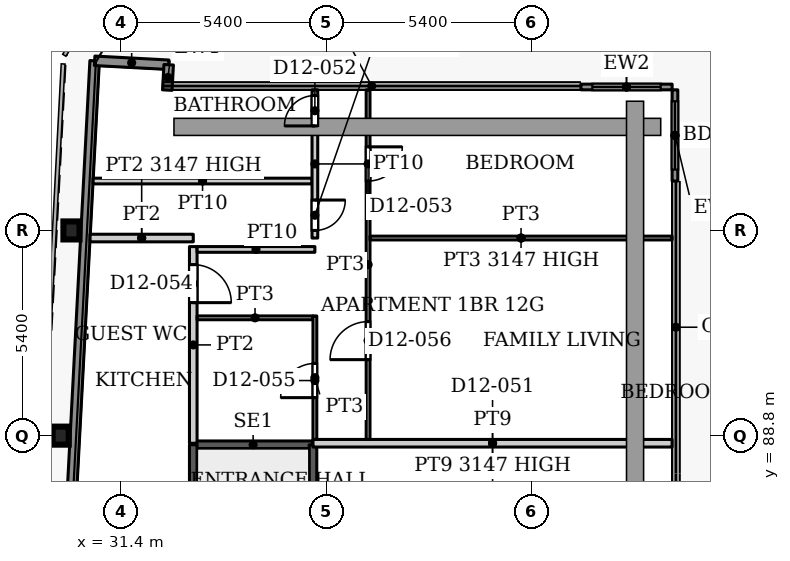
"""IFC4 building model, lengths in metres.
Left out: names, types, materials, properties, quantities, classifications, styles, units other than length and angle.
Written with IfcOpenShell. Run it as: python <this file> out.ifc"""

import sys

from ifc_helpers import new_model, si_unit, direction, frame, frame_2d, origin, origin_2d, place, context, subcontext, project, spatial, rectangle, i_section, extrude, source, transform, mapped, element, fill, save


model = new_model("IFC4")
c1 = context("Model", 3, precision=1e-05, world=origin(), true_north=direction((0.0, 1.0)))
c2 = subcontext(c1, "Body", "Model", "MODEL_VIEW")
j1 = project(units=[si_unit("LENGTHUNIT", "METRE"), si_unit("PLANEANGLEUNIT", "RADIAN")], contexts=[c1])
p1 = place(None, origin())
s1 = spatial("IfcSite", under=j1, at=p1, CompositionType="ELEMENT")
p2 = place(p1, origin())
s2 = spatial("IfcBuilding", under=s1, at=p2, CompositionType="ELEMENT")
p3 = place(p2, frame((0.0, 0.0, 53.9)))
s3 = spatial("IfcBuildingStorey", under=s2, at=p3, CompositionType="ELEMENT", Elevation=53.9)
for number, where, z_axis, x_axis in (
    (1, (29.811, 88.8, 0.0), (0.0, 0.0, 1.0), (1.0, 0.0, 0.0)),
    (2, (30.095, 94.2, 0.0), (0.0, 0.0, 1.0), (1.0, 0.0, 0.0)),
):
    element("IfcColumn", number, at=place(p3, frame(where, z_axis=z_axis, x_axis=x_axis)), inside=s3, PredefinedType="COLUMN", context=c2, shape_type="SweptSolid", body=[
        extrude(i_section(OverallWidth=0.424, OverallDepth=0.474, WebThickness=0.048, FlangeThickness=0.077, FilletRadius=0.014, at=origin_2d()), origin(), (0.0, 0.0, 1.0), 3.9),
    ])
p4 = place(p3, frame((27.195, 31.969, 0.0), z_axis=(0.0, 0.0, 1.0), x_axis=(0.052554995867, 0.998618031286, 0.0)))
e3 = element("IfcWall", 3, at=p4, inside=s3, PredefinedType="SOLIDWALL", context=c2, shape_type="SweptSolid", body=[
    extrude(rectangle(XDim=66.787, YDim=0.25, at=frame_2d((33.394, 0.0))), origin(), (0.0, 0.0, 1.0), 3.75),
])
p5 = place(p3, frame((30.705, 98.664, 0.0), z_axis=(0.0, 0.0, 1.0), x_axis=(0.998577785791, -0.053314216913, 0.0)))
e4 = element("IfcWall", 4, at=p5, inside=s3, PredefinedType="SOLIDWALL", context=c2, shape_type="SweptSolid", body=[
    extrude(rectangle(XDim=1.951, YDim=0.25, at=frame_2d((0.975, 0.0))), origin(), (0.0, 0.0, 1.0), 3.75),
])
p6 = place(p3, frame((32.653, 98.56, 0.0), z_axis=(0.0, 0.0, 1.0), x_axis=(-0.054093451632, -0.998535877418, 0.0)))
e5 = element("IfcWall", 5, at=p6, inside=s3, PredefinedType="SOLIDWALL", context=c2, shape_type="SweptSolid", body=[
    extrude(rectangle(XDim=0.668, YDim=0.25, at=frame_2d((0.334, 0.0))), origin(), (0.0, 0.0, 1.0), 3.75),
])
p7 = place(p3, frame((43.5, 97.975, 0.0), z_axis=(0.0, 0.0, 1.0), x_axis=(1.0, 0.0, 0.0)))
e6 = element("IfcWall", 6, at=p7, inside=s3, PredefinedType="SOLIDWALL", context=c2, shape_type="SweptSolid", body=[
    extrude(rectangle(XDim=2.4, YDim=0.15, at=frame_2d((1.2, 0.0))), origin(), (0.0, 0.0, 1.0), 3.75),
])
p8 = place(p7, frame((0.3, 0.0, 0.0)))
e7 = element("IfcOpeningElement", 7, at=p8, cuts=e6, PredefinedType="OPENING", context=c2, shape_type="SweptSolid", body=[
    extrude(rectangle(XDim=1.8, YDim=2.4, at=frame_2d((0.9, 1.2))), frame((0.0, 0.085, 0.0), z_axis=(0.0, -1.0, 0.0), x_axis=(1.0, 0.0, 0.0)), (0.0, 0.0, 1.0), 0.17),
])
p9 = place(p3, frame((45.975, 97.9, 0.0), z_axis=(0.0, 0.0, 1.0), x_axis=(0.0, -1.0, 0.0)))
e8 = element("IfcWall", 8, at=p9, inside=s3, PredefinedType="SOLIDWALL", context=c2, shape_type="SweptSolid", body=[
    extrude(rectangle(XDim=2.4, YDim=0.15, at=frame_2d((1.2, 0.0))), origin(), (0.0, 0.0, 1.0), 3.75),
])
p10 = place(p9, frame((0.3, 0.0, 0.0)))
e9 = element("IfcOpeningElement", 9, at=p10, cuts=e8, PredefinedType="OPENING", context=c2, shape_type="SweptSolid", body=[
    extrude(rectangle(XDim=1.8, YDim=2.4, at=frame_2d((0.9, 1.2))), frame((0.0, 0.085, 0.0), z_axis=(0.0, -1.0, 0.0), x_axis=(1.0, 0.0, 0.0)), (0.0, 0.0, 1.0), 0.17),
])
p11 = place(p3, frame((33.3, 88.56, 0.0), z_axis=(0.0, 0.0, 1.0), x_axis=(1.0, 0.0, 0.0)))
e10 = element("IfcWall", 10, at=p11, inside=s3, PredefinedType="SHEAR", context=c2, shape_type="SweptSolid", body=[
    extrude(rectangle(XDim=3.15, YDim=0.2, at=frame_2d((1.575, 0.0))), origin(), (0.0, 0.0, 1.0), 3.9),
])
p12 = place(p3, frame((33.3, 79.4, 0.0), z_axis=(0.0, 0.0, 1.0), x_axis=(0.0, 1.0, 0.0)))
e11 = element("IfcWall", 11, at=p12, inside=s3, PredefinedType="SHEAR", context=c2, shape_type="SweptSolid", body=[
    extrude(rectangle(XDim=9.16, YDim=0.2, at=frame_2d((4.58, 0.0))), origin(), (0.0, 0.0, 1.0), 3.9),
])
p13 = place(p12, frame((0.35, 0.0, 0.0)))
e12 = element("IfcOpeningElement", 12, at=p13, cuts=e11, PredefinedType="OPENING", context=c2, shape_type="SweptSolid", body=[
    extrude(rectangle(XDim=1.1, YDim=2.2, at=frame_2d((0.55, 1.1))), frame((0.0, 0.11, 0.0), z_axis=(0.0, -1.0, 0.0), x_axis=(1.0, 0.0, 0.0)), (0.0, 0.0, 1.0), 0.22),
])
p14 = place(p3, frame((36.45, 79.4, 0.0), z_axis=(0.0, 0.0, 1.0), x_axis=(0.0, 1.0, 0.0)))
e13 = element("IfcWall", 13, at=p14, inside=s3, PredefinedType="SHEAR", context=c2, shape_type="SweptSolid", body=[
    extrude(rectangle(XDim=9.16, YDim=0.2, at=frame_2d((4.58, 0.0))), origin(), (0.0, 0.0, 1.0), 3.9),
])
p15 = place(p3, frame((30.664, 95.5, 0.0), z_axis=(0.0, 0.0, 1.0), x_axis=(1.0, 0.0, 0.0)))
e14 = element("IfcWall", 14, at=p15, inside=s3, PredefinedType="PARTITIONING", context=c2, shape_type="SweptSolid", body=[
    extrude(rectangle(XDim=5.761, YDim=0.15, at=frame_2d((2.88, 0.0))), origin(), (0.0, 0.0, 1.0), 3.6),
])
p16 = place(p3, frame((30.585, 94.0, 0.0), z_axis=(0.0, 0.0, 1.0), x_axis=(1.0, 0.0, 0.0)))
e15 = element("IfcWall", 15, at=p16, inside=s3, PredefinedType="PARTITIONING", context=c2, shape_type="SweptSolid", body=[
    extrude(rectangle(XDim=2.715, YDim=0.2, at=frame_2d((1.358, 0.0))), origin(), (0.0, 0.0, 1.0), 3.147),
])
p17 = place(p3, frame((33.3, 88.6, 0.0), z_axis=(0.0, 0.0, 1.0), x_axis=(0.0, 1.0, 0.0)))
e16 = element("IfcWall", 16, at=p17, inside=s3, PredefinedType="PARTITIONING", context=c2, shape_type="SweptSolid", body=[
    extrude(rectangle(XDim=5.175, YDim=0.2, at=frame_2d((2.587, 0.0))), origin(), (0.0, 0.0, 1.0), 3.6),
])
p18 = place(p17, frame((3.7, 0.0, 0.0)))
e17 = element("IfcOpeningElement", 17, at=p18, cuts=e16, PredefinedType="OPENING", context=c2, shape_type="SweptSolid", body=[
    extrude(rectangle(XDim=1.0, YDim=2.1, at=frame_2d((0.5, 1.05))), frame((0.0, 0.11, 0.0), z_axis=(0.0, -1.0, 0.0), x_axis=(1.0, 0.0, 0.0)), (0.0, 0.0, 1.0), 0.22),
])
p19 = place(p3, frame((33.4, 91.9, 0.0), z_axis=(0.0, 0.0, 1.0), x_axis=(1.0, 0.0, 0.0)))
e18 = element("IfcWall", 18, at=p19, inside=s3, PredefinedType="PARTITIONING", context=c2, shape_type="SweptSolid", body=[
    extrude(rectangle(XDim=3.05, YDim=0.1, at=frame_2d((1.525, 0.0))), origin(), (0.0, 0.0, 1.0), 3.6),
])
p20 = place(p3, frame((33.4, 93.7, 0.0), z_axis=(0.0, 0.0, 1.0), x_axis=(1.0, 0.0, 0.0)))
e19 = element("IfcWall", 19, at=p20, inside=s3, PredefinedType="PARTITIONING", context=c2, shape_type="SweptSolid", body=[
    extrude(rectangle(XDim=3.1, YDim=0.15, at=frame_2d((1.55, 0.0))), origin(), (0.0, 0.0, 1.0), 3.6),
])
p21 = place(p3, frame((36.45, 88.6, 0.0), z_axis=(0.0, 0.0, 1.0), x_axis=(1.0, 0.0, 0.0)))
e20 = element("IfcWall", 20, at=p21, inside=s3, PredefinedType="PARTITIONING", context=c2, shape_type="SweptSolid", body=[
    extrude(rectangle(XDim=9.45, YDim=0.2, at=frame_2d((4.725, 0.0))), origin(), (0.0, 0.0, 1.0), 3.147),
])
p22 = place(p3, frame((36.5, 88.7, 0.0), z_axis=(0.0, 0.0, 1.0), x_axis=(0.0, 1.0, 0.0)))
e21 = element("IfcWall", 21, at=p22, inside=s3, PredefinedType="PARTITIONING", context=c2, shape_type="SweptSolid", body=[
    extrude(rectangle(XDim=3.25, YDim=0.1, at=frame_2d((1.625, 0.0))), origin(), (0.0, 0.0, 1.0), 3.6),
])
p23 = place(p22, frame((1.1, 0.0, 0.0)))
e22 = element("IfcOpeningElement", 22, at=p23, cuts=e21, PredefinedType="OPENING", context=c2, shape_type="SweptSolid", body=[
    extrude(rectangle(XDim=0.9, YDim=2.1, at=frame_2d((0.45, 1.05))), frame((0.0, 0.06, 0.0), z_axis=(0.0, -1.0, 0.0), x_axis=(1.0, 0.0, 0.0)), (0.0, 0.0, 1.0), 0.12),
])
p24 = place(p3, frame((36.5, 94.0, 0.0), z_axis=(0.0, 0.0, 1.0), x_axis=(0.0, 1.0, 0.0)))
e23 = element("IfcWall", 23, at=p24, inside=s3, PredefinedType="PARTITIONING", context=c2, shape_type="SweptSolid", body=[
    extrude(rectangle(XDim=3.9, YDim=0.15, at=frame_2d((1.95, 0.0))), origin(), (0.0, 0.0, 1.0), 3.6),
])
p25 = place(p24, frame((2.95, 0.0, 0.0)))
e24 = element("IfcOpeningElement", 24, at=p25, cuts=e23, PredefinedType="OPENING", context=c2, shape_type="SweptSolid", body=[
    extrude(rectangle(XDim=0.8, YDim=2.1, at=frame_2d((0.4, 1.05))), frame((0.0, 0.085, 0.0), z_axis=(0.0, -1.0, 0.0), x_axis=(1.0, 0.0, 0.0)), (0.0, 0.0, 1.0), 0.17),
])
p26 = place(p24, frame((0.2, 0.0, 0.0)))
e25 = element("IfcOpeningElement", 25, at=p26, cuts=e23, PredefinedType="OPENING", context=c2, shape_type="SweptSolid", body=[
    extrude(rectangle(XDim=0.8, YDim=2.1, at=frame_2d((0.4, 1.05))), frame((0.0, 0.085, 0.0), z_axis=(0.0, -1.0, 0.0), x_axis=(1.0, 0.0, 0.0)), (0.0, 0.0, 1.0), 0.17),
])
p27 = place(p3, frame((37.9, 88.7, 0.0), z_axis=(0.0, 0.0, 1.0), x_axis=(0.0, 1.0, 0.0)))
e26 = element("IfcWall", 26, at=p27, inside=s3, PredefinedType="PARTITIONING", context=c2, shape_type="SweptSolid", body=[
    extrude(rectangle(XDim=9.2, YDim=0.1, at=frame_2d((4.6, 0.0))), origin(), (0.0, 0.0, 1.0), 3.6),
])
p28 = place(p27, frame((6.8, 0.0, 0.0)))
e27 = element("IfcOpeningElement", 27, at=p28, cuts=e26, PredefinedType="OPENING", context=c2, shape_type="SweptSolid", body=[
    extrude(rectangle(XDim=0.9, YDim=2.1, at=frame_2d((0.45, 1.05))), frame((0.0, 0.06, 0.0), z_axis=(0.0, -1.0, 0.0), x_axis=(1.0, 0.0, 0.0)), (0.0, 0.0, 1.0), 0.12),
])
p29 = place(p27, frame((2.1, 0.0, 0.0)))
e28 = element("IfcOpeningElement", 28, at=p29, cuts=e26, PredefinedType="OPENING", context=c2, shape_type="SweptSolid", body=[
    extrude(rectangle(XDim=1.0, YDim=2.1, at=frame_2d((0.5, 1.05))), frame((0.0, 0.06, 0.0), z_axis=(0.0, -1.0, 0.0), x_axis=(1.0, 0.0, 0.0)), (0.0, 0.0, 1.0), 0.12),
])
p30 = place(p3, frame((37.95, 94.0, 0.0), z_axis=(0.0, 0.0, 1.0), x_axis=(1.0, 0.0, 0.0)))
e29 = element("IfcWall", 29, at=p30, inside=s3, PredefinedType="PARTITIONING", context=c2, shape_type="SweptSolid", body=[
    extrude(rectangle(XDim=7.95, YDim=0.1, at=frame_2d((3.975, 0.0))), origin(), (0.0, 0.0, 1.0), 3.147),
])
m1 = source(origin(), c2, "Body", "SweptSolid", [
    extrude(rectangle(XDim=1.8, YDim=2.4, at=frame_2d((0.9, 1.2))), frame((0.0, 0.025, 0.0), z_axis=(0.0, -1.0, 0.0), x_axis=(1.0, 0.0, 0.0)), (0.0, 0.0, 1.0), 0.05),
])
p31 = place(p8, origin())
e30 = element("IfcDoor", 30, at=p31, inside=s3, OperationType="SLIDING_TO_LEFT", PredefinedType="DOOR", context=c2, shape_type="MappedRepresentation", body=[
    mapped(m1, transform((0.0, 0.0, 0.0), x_axis=(1.0, 0.0, 0.0), y_axis=(0.0, 1.0, 0.0), z_axis=(0.0, 0.0, 1.0), scale=1.0)),
])
fill(e7, e30)
p32 = place(p10, origin())
e31 = element("IfcDoor", 31, at=p32, inside=s3, OperationType="SLIDING_TO_LEFT", PredefinedType="DOOR", context=c2, shape_type="MappedRepresentation", body=[
    mapped(m1, transform((0.0, 0.0, 0.0), x_axis=(1.0, 0.0, 0.0), y_axis=(0.0, 1.0, 0.0), z_axis=(0.0, 0.0, 1.0), scale=1.0)),
])
fill(e9, e31)
m2 = source(origin(), c2, "Body", "SweptSolid", [
    extrude(rectangle(XDim=0.8, YDim=2.1, at=frame_2d((0.4, 1.05))), frame((0.0, 0.025, 0.0), z_axis=(0.0, -1.0, 0.0), x_axis=(1.0, 0.0, 0.0)), (0.0, 0.0, 1.0), 0.05),
])
p33 = place(p25, origin())
e32 = element("IfcDoor", 32, at=p33, inside=s3, OperationType="SINGLE_SWING_LEFT", PredefinedType="DOOR", context=c2, shape_type="MappedRepresentation", body=[
    mapped(m2, transform((0.0, 0.0, 0.0), x_axis=(1.0, 0.0, 0.0), y_axis=(0.0, 1.0, 0.0), z_axis=(0.0, 0.0, 1.0), scale=1.0)),
])
fill(e24, e32)
m3 = source(origin(), c2, "Body", "SweptSolid", [
    extrude(rectangle(XDim=0.9, YDim=2.1, at=frame_2d((0.45, 1.05))), frame((0.0, 0.025, 0.0), z_axis=(0.0, -1.0, 0.0), x_axis=(1.0, 0.0, 0.0)), (0.0, 0.0, 1.0), 0.05),
])
p34 = place(p28, origin())
e33 = element("IfcDoor", 33, at=p34, inside=s3, OperationType="SINGLE_SWING_RIGHT", PredefinedType="DOOR", context=c2, shape_type="MappedRepresentation", body=[
    mapped(m3, transform((0.0, 0.0, 0.0), x_axis=(1.0, 0.0, 0.0), y_axis=(0.0, 1.0, 0.0), z_axis=(0.0, 0.0, 1.0), scale=1.0)),
])
fill(e27, e33)
m4 = source(origin(), c2, "Body", "SweptSolid", [
    extrude(rectangle(XDim=1.0, YDim=2.1, at=frame_2d((0.5, 1.05))), frame((0.0, 0.025, 0.0), z_axis=(0.0, -1.0, 0.0), x_axis=(1.0, 0.0, 0.0)), (0.0, 0.0, 1.0), 0.05),
])
p35 = place(p18, origin())
e34 = element("IfcDoor", 34, at=p35, inside=s3, OperationType="SINGLE_SWING_RIGHT", PredefinedType="DOOR", context=c2, shape_type="MappedRepresentation", body=[
    mapped(m4, transform((0.0, 0.0, 0.0), x_axis=(1.0, 0.0, 0.0), y_axis=(0.0, 1.0, 0.0), z_axis=(0.0, 0.0, 1.0), scale=1.0)),
])
fill(e17, e34)
p36 = place(p23, origin())
e35 = element("IfcDoor", 35, at=p36, inside=s3, OperationType="SINGLE_SWING_LEFT", PredefinedType="DOOR", context=c2, shape_type="MappedRepresentation", body=[
    mapped(m3, transform((0.0, 0.0, 0.0), x_axis=(1.0, 0.0, 0.0), y_axis=(0.0, 1.0, 0.0), z_axis=(0.0, 0.0, 1.0), scale=1.0)),
])
fill(e22, e35)
m5 = source(origin(), c2, "Body", "SweptSolid", [
    extrude(rectangle(XDim=1.0, YDim=2.1, at=frame_2d((0.5, 1.05))), frame((0.0, 0.025, 0.0), z_axis=(0.0, -1.0, 0.0), x_axis=(1.0, 0.0, 0.0)), (0.0, 0.0, 1.0), 0.05),
])
p37 = place(p29, origin())
e36 = element("IfcDoor", 36, at=p37, inside=s3, OperationType="SINGLE_SWING_LEFT", PredefinedType="DOOR", context=c2, shape_type="MappedRepresentation", body=[
    mapped(m5, transform((0.0, 0.0, 0.0), x_axis=(1.0, 0.0, 0.0), y_axis=(0.0, 1.0, 0.0), z_axis=(0.0, 0.0, 1.0), scale=1.0)),
])
fill(e28, e36)
p38 = place(p26, origin())
e37 = element("IfcDoor", 37, at=p38, inside=s3, OperationType="SINGLE_SWING_RIGHT", PredefinedType="DOOR", context=c2, shape_type="MappedRepresentation", body=[
    mapped(m2, transform((0.0, 0.0, 0.0), x_axis=(1.0, 0.0, 0.0), y_axis=(0.0, 1.0, 0.0), z_axis=(0.0, 0.0, 1.0), scale=1.0)),
])
fill(e25, e37)
save(model, sys.argv[1])
